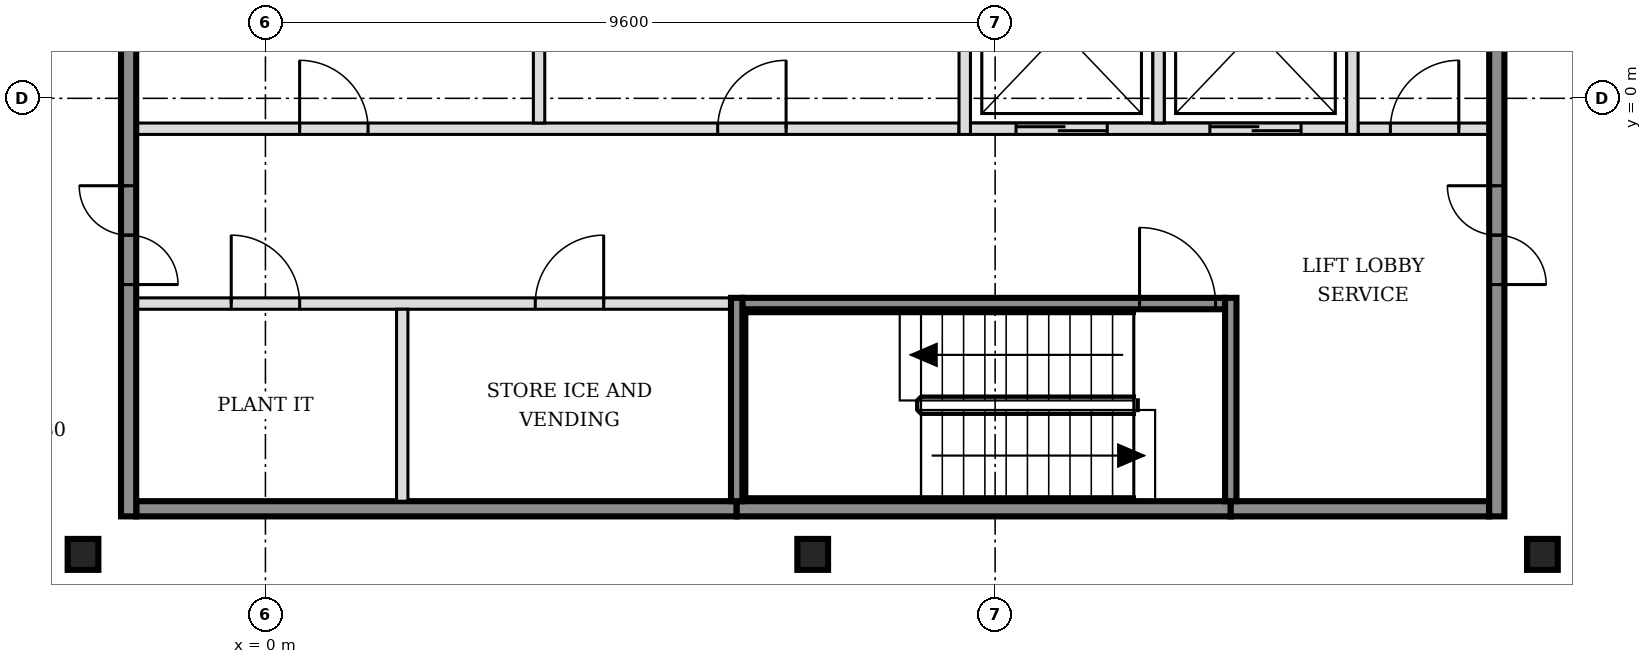
"""IFC4 building model, lengths in metres.
Left out: names, types, materials, properties, quantities, classifications, styles, units other than length and angle.
Written with IfcOpenShell. Run it as: python <this file> out.ifc"""

import sys

from ifc_helpers import new_model, si_unit, direction, frame, frame_2d, origin, origin_2d, place, context, subcontext, project, spatial, rectangle, i_section, extrude, element, fill, save


model = new_model("IFC4")
c1 = context("Model", 3, precision=1e-05, world=origin(), true_north=direction((0.0, 1.0)))
c2 = subcontext(c1, "Body", "Model", "MODEL_VIEW")
j1 = project(units=[si_unit("LENGTHUNIT", "METRE"), si_unit("PLANEANGLEUNIT", "RADIAN")], contexts=[c1])
p1 = place(None, origin())
s1 = spatial("IfcSite", under=j1, at=p1, CompositionType="ELEMENT")
p2 = place(p1, origin())
s2 = spatial("IfcBuilding", under=s1, at=p2, CompositionType="ELEMENT")
p3 = place(p2, frame((0.0, 0.0, 193.8)))
s3 = spatial("IfcBuildingStorey", under=s2, at=p3, CompositionType="ELEMENT", Elevation=193.8)
for number, where, z_axis, x_axis in (
    (1, (-2.4, -6.0, -0.15), (0.0, 0.0, 1.0), (1.0, 0.0, 0.0)),
    (2, (7.2, -6.0, -0.15), (0.0, 0.0, 1.0), (1.0, 0.0, 0.0)),
    (3, (16.8, -6.0, -0.15), (0.0, 0.0, 1.0), (1.0, 0.0, 0.0)),
):
    element("IfcColumn", number, at=place(p3, frame(where, z_axis=z_axis, x_axis=x_axis)), inside=s3, PredefinedType="COLUMN", context=c2, shape_type="SweptSolid", body=[
        extrude(i_section(OverallWidth=0.404, OverallDepth=0.407, WebThickness=0.027, FlangeThickness=0.044, FilletRadius=0.015, at=origin_2d()), origin(), (0.0, 0.0, 1.0), 3.6),
    ])
p4 = place(p3, frame((-1.7, -5.4, 0.0), z_axis=(0.0, 0.0, 1.0), x_axis=(1.0, 0.0, 0.0)))
e4 = element("IfcWall", 4, at=p4, inside=s3, PredefinedType="SOLIDWALL", context=c2, shape_type="SweptSolid", body=[
    extrude(rectangle(XDim=7.9, YDim=0.2, at=frame_2d((3.95, 0.0))), origin(), (0.0, 0.0, 1.0), 3.45),
])
p5 = place(p3, frame((6.2, -5.4, 0.0), z_axis=(0.0, 0.0, 1.0), x_axis=(1.0, 0.0, 0.0)))
e5 = element("IfcWall", 5, at=p5, inside=s3, PredefinedType="SOLIDWALL", context=c2, shape_type="SweptSolid", body=[
    extrude(rectangle(XDim=6.5, YDim=0.2, at=frame_2d((3.25, 0.0))), origin(), (0.0, 0.0, 1.0), 3.45),
])
p6 = place(p3, frame((12.7, -5.4, 0.0), z_axis=(0.0, 0.0, 1.0), x_axis=(1.0, 0.0, 0.0)))
e6 = element("IfcWall", 6, at=p6, inside=s3, PredefinedType="SOLIDWALL", context=c2, shape_type="SweptSolid", body=[
    extrude(rectangle(XDim=3.4, YDim=0.2, at=frame_2d((1.7, 0.0))), origin(), (0.0, 0.0, 1.0), 3.45),
])
p7 = place(p3, frame((-1.7, -2.7, 0.0), z_axis=(0.0, 0.0, 1.0), x_axis=(1.0, 0.0, 0.0)))
e7 = element("IfcWall", 7, at=p7, inside=s3, PredefinedType="PARTITIONING", context=c2, shape_type="SweptSolid", body=[
    extrude(rectangle(XDim=7.825, YDim=0.15, at=frame_2d((3.913, 0.0))), origin(), (0.0, 0.0, 1.0), 3.45),
])
p8 = place(p7, frame((1.25, 0.0, 0.0)))
e8 = element("IfcOpeningElement", 8, at=p8, cuts=e7, PredefinedType="OPENING", context=c2, shape_type="SweptSolid", body=[
    extrude(rectangle(XDim=0.9, YDim=2.1, at=frame_2d((0.45, 1.05))), frame((0.0, 0.085, 0.0), z_axis=(0.0, -1.0, 0.0), x_axis=(1.0, 0.0, 0.0)), (0.0, 0.0, 1.0), 0.17),
])
p9 = place(p7, frame((5.25, 0.0, 0.0)))
e9 = element("IfcOpeningElement", 9, at=p9, cuts=e7, PredefinedType="OPENING", context=c2, shape_type="SweptSolid", body=[
    extrude(rectangle(XDim=0.9, YDim=2.1, at=frame_2d((0.45, 1.05))), frame((0.0, 0.085, 0.0), z_axis=(0.0, -1.0, 0.0), x_axis=(1.0, 0.0, 0.0)), (0.0, 0.0, 1.0), 0.17),
])
p10 = place(p3, frame((6.275, -2.7, 0.0), z_axis=(0.0, 0.0, 1.0), x_axis=(1.0, 0.0, 0.0)))
e10 = element("IfcWall", 10, at=p10, inside=s3, PredefinedType="SOLIDWALL", context=c2, shape_type="SweptSolid", body=[
    extrude(rectangle(XDim=6.35, YDim=0.15, at=frame_2d((3.175, 0.0))), origin(), (0.0, 0.0, 1.0), 3.45),
])
p11 = place(p10, frame((5.225, 0.0, 0.0)))
e11 = element("IfcOpeningElement", 11, at=p11, cuts=e10, PredefinedType="OPENING", context=c2, shape_type="SweptSolid", body=[
    extrude(rectangle(XDim=1.0, YDim=2.1, at=frame_2d((0.5, 1.05))), frame((0.0, 0.085, 0.0), z_axis=(0.0, -1.0, 0.0), x_axis=(1.0, 0.0, 0.0)), (0.0, 0.0, 1.0), 0.17),
])
p12 = place(p3, frame((-1.7, -0.4, 0.0), z_axis=(0.0, 0.0, 1.0), x_axis=(1.0, 0.0, 0.0)))
e12 = element("IfcWall", 12, at=p12, inside=s3, PredefinedType="PARTITIONING", context=c2, shape_type="SweptSolid", body=[
    extrude(rectangle(XDim=10.825, YDim=0.15, at=frame_2d((5.413, 0.0))), origin(), (0.0, 0.0, 1.0), 3.45),
])
p13 = place(p12, frame((2.15, 0.0, 0.0)))
e13 = element("IfcOpeningElement", 13, at=p13, cuts=e12, PredefinedType="OPENING", context=c2, shape_type="SweptSolid", body=[
    extrude(rectangle(XDim=0.9, YDim=2.1, at=frame_2d((0.45, 1.05))), frame((0.0, 0.085, 0.0), z_axis=(0.0, -1.0, 0.0), x_axis=(1.0, 0.0, 0.0)), (0.0, 0.0, 1.0), 0.17),
])
p14 = place(p12, frame((7.65, 0.0, 0.0)))
e14 = element("IfcOpeningElement", 14, at=p14, cuts=e12, PredefinedType="OPENING", context=c2, shape_type="SweptSolid", body=[
    extrude(rectangle(XDim=0.9, YDim=2.1, at=frame_2d((0.45, 1.05))), frame((0.0, 0.085, 0.0), z_axis=(0.0, -1.0, 0.0), x_axis=(1.0, 0.0, 0.0)), (0.0, 0.0, 1.0), 0.17),
])
p15 = place(p3, frame((9.275, -0.4, 0.0), z_axis=(0.0, 0.0, 1.0), x_axis=(1.0, 0.0, 0.0)))
e15 = element("IfcWall", 15, at=p15, inside=s3, PredefinedType="SOLIDWALL", context=c2, shape_type="SweptSolid", body=[
    extrude(rectangle(XDim=4.95, YDim=0.15, at=frame_2d((2.475, 0.0))), origin(), (0.0, 0.0, 1.0), 3.45),
])
p16 = place(p15, frame((0.6, 0.0, 0.0)))
e16 = element("IfcOpeningElement", 16, at=p16, cuts=e15, PredefinedType="OPENING", context=c2, shape_type="SweptSolid", body=[
    extrude(rectangle(XDim=1.2, YDim=2.1, at=frame_2d((0.6, 1.05))), frame((0.0, 0.085, 0.0), z_axis=(0.0, -1.0, 0.0), x_axis=(1.0, 0.0, 0.0)), (0.0, 0.0, 1.0), 0.17),
])
p17 = place(p15, frame((3.15, 0.0, 0.0)))
e17 = element("IfcOpeningElement", 17, at=p17, cuts=e15, PredefinedType="OPENING", context=c2, shape_type="SweptSolid", body=[
    extrude(rectangle(XDim=1.2, YDim=2.1, at=frame_2d((0.6, 1.05))), frame((0.0, 0.085, 0.0), z_axis=(0.0, -1.0, 0.0), x_axis=(1.0, 0.0, 0.0)), (0.0, 0.0, 1.0), 0.17),
])
p18 = place(p3, frame((14.375, -0.4, 0.0), z_axis=(0.0, 0.0, 1.0), x_axis=(1.0, 0.0, 0.0)))
e18 = element("IfcWall", 18, at=p18, inside=s3, PredefinedType="PARTITIONING", context=c2, shape_type="SweptSolid", body=[
    extrude(rectangle(XDim=1.725, YDim=0.15, at=frame_2d((0.863, 0.0))), origin(), (0.0, 0.0, 1.0), 3.45),
])
p19 = place(p18, frame((0.425, 0.0, 0.0)))
e19 = element("IfcOpeningElement", 19, at=p19, cuts=e18, PredefinedType="OPENING", context=c2, shape_type="SweptSolid", body=[
    extrude(rectangle(XDim=0.9, YDim=2.1, at=frame_2d((0.45, 1.05))), frame((0.0, 0.085, 0.0), z_axis=(0.0, -1.0, 0.0), x_axis=(1.0, 0.0, 0.0)), (0.0, 0.0, 1.0), 0.17),
])
p20 = place(p3, frame((-1.8, -5.5, 0.0), z_axis=(0.0, 0.0, 1.0), x_axis=(0.0, 1.0, 0.0)))
e20 = element("IfcWall", 20, at=p20, inside=s3, PredefinedType="SOLIDWALL", context=c2, shape_type="SweptSolid", body=[
    extrude(rectangle(XDim=15.8, YDim=0.2, at=frame_2d((7.9, 0.0))), origin(), (0.0, 0.0, 1.0), 3.45),
])
p21 = place(p20, frame((3.05, 0.0, 0.0)))
e21 = element("IfcOpeningElement", 21, at=p21, cuts=e20, PredefinedType="OPENING", context=c2, shape_type="SweptSolid", body=[
    extrude(rectangle(XDim=1.3, YDim=2.1, at=frame_2d((0.65, 1.05))), frame((0.0, 0.11, 0.0), z_axis=(0.0, -1.0, 0.0), x_axis=(1.0, 0.0, 0.0)), (0.0, 0.0, 1.0), 0.22),
])
p22 = place(p20, frame((11.45, 0.0, 0.0)))
e22 = element("IfcOpeningElement", 22, at=p22, cuts=e20, PredefinedType="OPENING", context=c2, shape_type="SweptSolid", body=[
    extrude(rectangle(XDim=1.3, YDim=2.1, at=frame_2d((0.65, 1.05))), frame((0.0, 0.11, 0.0), z_axis=(0.0, -1.0, 0.0), x_axis=(1.0, 0.0, 0.0)), (0.0, 0.0, 1.0), 0.22),
])
p23 = place(p3, frame((1.8, -5.3, 0.0), z_axis=(0.0, 0.0, 1.0), x_axis=(0.0, 1.0, 0.0)))
e23 = element("IfcWall", 23, at=p23, inside=s3, PredefinedType="PARTITIONING", context=c2, shape_type="SweptSolid", body=[
    extrude(rectangle(XDim=2.525, YDim=0.15, at=frame_2d((1.263, 0.0))), origin(), (0.0, 0.0, 1.0), 3.45),
])
p24 = place(p3, frame((3.6, -0.325, 0.0), z_axis=(0.0, 0.0, 1.0), x_axis=(0.0, 1.0, 0.0)))
e24 = element("IfcWall", 24, at=p24, inside=s3, PredefinedType="PARTITIONING", context=c2, shape_type="SweptSolid", body=[
    extrude(rectangle(XDim=2.45, YDim=0.15, at=frame_2d((1.225, 0.0))), origin(), (0.0, 0.0, 1.0), 3.45),
])
p25 = place(p3, frame((6.2, -5.3, 0.0), z_axis=(0.0, 0.0, 1.0), x_axis=(0.0, 1.0, 0.0)))
e25 = element("IfcWall", 25, at=p25, inside=s3, PredefinedType="SOLIDWALL", context=c2, shape_type="SweptSolid", body=[
    extrude(rectangle(XDim=2.675, YDim=0.15, at=frame_2d((1.337, 0.0))), origin(), (0.0, 0.0, 1.0), 3.45),
])
p26 = place(p3, frame((9.2, -0.475, 0.0), z_axis=(0.0, 0.0, 1.0), x_axis=(0.0, 1.0, 0.0)))
e26 = element("IfcWall", 26, at=p26, inside=s3, PredefinedType="SOLIDWALL", context=c2, shape_type="SweptSolid", body=[
    extrude(rectangle(XDim=2.6, YDim=0.15, at=frame_2d((1.3, 0.0))), origin(), (0.0, 0.0, 1.0), 3.45),
])
p27 = place(p3, frame((11.75, -0.325, 0.0), z_axis=(0.0, 0.0, 1.0), x_axis=(0.0, 1.0, 0.0)))
e27 = element("IfcWall", 27, at=p27, inside=s3, PredefinedType="SOLIDWALL", context=c2, shape_type="SweptSolid", body=[
    extrude(rectangle(XDim=2.45, YDim=0.15, at=frame_2d((1.225, 0.0))), origin(), (0.0, 0.0, 1.0), 3.45),
])
p28 = place(p3, frame((12.7, -5.3, 0.0), z_axis=(0.0, 0.0, 1.0), x_axis=(0.0, 1.0, 0.0)))
e28 = element("IfcWall", 28, at=p28, inside=s3, PredefinedType="SOLIDWALL", context=c2, shape_type="SweptSolid", body=[
    extrude(rectangle(XDim=2.675, YDim=0.15, at=frame_2d((1.337, 0.0))), origin(), (0.0, 0.0, 1.0), 3.45),
])
p29 = place(p3, frame((14.3, -0.475, 0.0), z_axis=(0.0, 0.0, 1.0), x_axis=(0.0, 1.0, 0.0)))
e29 = element("IfcWall", 29, at=p29, inside=s3, PredefinedType="SOLIDWALL", context=c2, shape_type="SweptSolid", body=[
    extrude(rectangle(XDim=2.75, YDim=0.15, at=frame_2d((1.375, 0.0))), origin(), (0.0, 0.0, 1.0), 3.45),
])
p30 = place(p3, frame((16.2, -5.5, 0.0), z_axis=(0.0, 0.0, 1.0), x_axis=(0.0, 1.0, 0.0)))
e30 = element("IfcWall", 30, at=p30, inside=s3, PredefinedType="SOLIDWALL", context=c2, shape_type="SweptSolid", body=[
    extrude(rectangle(XDim=15.8, YDim=0.2, at=frame_2d((7.9, 0.0))), origin(), (0.0, 0.0, 1.0), 3.45),
])
p31 = place(p30, frame((3.05, 0.0, 0.0)))
e31 = element("IfcOpeningElement", 31, at=p31, cuts=e30, PredefinedType="OPENING", context=c2, shape_type="SweptSolid", body=[
    extrude(rectangle(XDim=1.3, YDim=2.1, at=frame_2d((0.65, 1.05))), frame((0.0, 0.11, 0.0), z_axis=(0.0, -1.0, 0.0), x_axis=(1.0, 0.0, 0.0)), (0.0, 0.0, 1.0), 0.22),
])
p32 = place(p30, frame((11.45, 0.0, 0.0)))
e32 = element("IfcOpeningElement", 32, at=p32, cuts=e30, PredefinedType="OPENING", context=c2, shape_type="SweptSolid", body=[
    extrude(rectangle(XDim=1.3, YDim=2.1, at=frame_2d((0.65, 1.05))), frame((0.0, 0.11, 0.0), z_axis=(0.0, -1.0, 0.0), x_axis=(1.0, 0.0, 0.0)), (0.0, 0.0, 1.0), 0.22),
])
p33 = place(p16, origin())
e33 = element("IfcDoor", 33, at=p33, inside=s3, OperationType="DOUBLE_DOOR_SLIDING", PredefinedType="DOOR", context=c2, shape_type="SweptSolid", body=[
    extrude(rectangle(XDim=1.2, YDim=2.1, at=frame_2d((0.6, 1.05))), frame((0.0, 0.025, 0.0), z_axis=(0.0, -1.0, 0.0), x_axis=(1.0, 0.0, 0.0)), (0.0, 0.0, 1.0), 0.05),
])
fill(e16, e33)
p34 = place(p17, origin())
e34 = element("IfcDoor", 34, at=p34, inside=s3, OperationType="DOUBLE_DOOR_SLIDING", PredefinedType="DOOR", context=c2, shape_type="SweptSolid", body=[
    extrude(rectangle(XDim=1.2, YDim=2.1, at=frame_2d((0.6, 1.05))), frame((0.0, 0.025, 0.0), z_axis=(0.0, -1.0, 0.0), x_axis=(1.0, 0.0, 0.0)), (0.0, 0.0, 1.0), 0.05),
])
fill(e17, e34)
p35 = place(p11, origin())
e35 = element("IfcDoor", 35, at=p35, inside=s3, OperationType="SINGLE_SWING_LEFT", PredefinedType="DOOR", context=c2, shape_type="SweptSolid", body=[
    extrude(rectangle(XDim=1.0, YDim=2.1, at=frame_2d((0.5, 1.05))), frame((0.0, 0.025, 0.0), z_axis=(0.0, -1.0, 0.0), x_axis=(1.0, 0.0, 0.0)), (0.0, 0.0, 1.0), 0.05),
])
fill(e11, e35)
p36 = place(p21, origin())
e36 = element("IfcDoor", 36, at=p36, inside=s3, OperationType="DOUBLE_DOOR_SINGLE_SWING", PredefinedType="DOOR", context=c2, shape_type="SweptSolid", body=[
    extrude(rectangle(XDim=1.3, YDim=2.1, at=frame_2d((0.65, 1.05))), frame((0.0, 0.025, 0.0), z_axis=(0.0, -1.0, 0.0), x_axis=(1.0, 0.0, 0.0)), (0.0, 0.0, 1.0), 0.05),
])
fill(e21, e36)
p37 = place(p31, origin())
e37 = element("IfcDoor", 37, at=p37, inside=s3, OperationType="DOUBLE_DOOR_SINGLE_SWING", PredefinedType="DOOR", context=c2, shape_type="SweptSolid", body=[
    extrude(rectangle(XDim=1.3, YDim=2.1, at=frame_2d((0.65, 1.05))), frame((0.0, 0.025, 0.0), z_axis=(0.0, -1.0, 0.0), x_axis=(1.0, 0.0, 0.0)), (0.0, 0.0, 1.0), 0.05),
])
fill(e31, e37)
p38 = place(p19, origin())
e38 = element("IfcDoor", 38, at=p38, inside=s3, OperationType="SINGLE_SWING_RIGHT", PredefinedType="DOOR", context=c2, shape_type="SweptSolid", body=[
    extrude(rectangle(XDim=0.9, YDim=2.1, at=frame_2d((0.45, 1.05))), frame((0.0, 0.025, 0.0), z_axis=(0.0, -1.0, 0.0), x_axis=(1.0, 0.0, 0.0)), (0.0, 0.0, 1.0), 0.05),
])
fill(e19, e38)
p39 = place(p8, origin())
e39 = element("IfcDoor", 39, at=p39, inside=s3, OperationType="SINGLE_SWING_LEFT", PredefinedType="DOOR", context=c2, shape_type="SweptSolid", body=[
    extrude(rectangle(XDim=0.9, YDim=2.1, at=frame_2d((0.45, 1.05))), frame((0.0, 0.025, 0.0), z_axis=(0.0, -1.0, 0.0), x_axis=(1.0, 0.0, 0.0)), (0.0, 0.0, 1.0), 0.05),
])
fill(e8, e39)
p40 = place(p9, origin())
e40 = element("IfcDoor", 40, at=p40, inside=s3, OperationType="SINGLE_SWING_RIGHT", PredefinedType="DOOR", context=c2, shape_type="SweptSolid", body=[
    extrude(rectangle(XDim=0.9, YDim=2.1, at=frame_2d((0.45, 1.05))), frame((0.0, 0.025, 0.0), z_axis=(0.0, -1.0, 0.0), x_axis=(1.0, 0.0, 0.0)), (0.0, 0.0, 1.0), 0.05),
])
fill(e9, e40)
p41 = place(p13, origin())
e41 = element("IfcDoor", 41, at=p41, inside=s3, OperationType="SINGLE_SWING_LEFT", PredefinedType="DOOR", context=c2, shape_type="SweptSolid", body=[
    extrude(rectangle(XDim=0.9, YDim=2.1, at=frame_2d((0.45, 1.05))), frame((0.0, 0.025, 0.0), z_axis=(0.0, -1.0, 0.0), x_axis=(1.0, 0.0, 0.0)), (0.0, 0.0, 1.0), 0.05),
])
fill(e13, e41)
p42 = place(p14, origin())
e42 = element("IfcDoor", 42, at=p42, inside=s3, OperationType="SINGLE_SWING_RIGHT", PredefinedType="DOOR", context=c2, shape_type="SweptSolid", body=[
    extrude(rectangle(XDim=0.9, YDim=2.1, at=frame_2d((0.45, 1.05))), frame((0.0, 0.025, 0.0), z_axis=(0.0, -1.0, 0.0), x_axis=(1.0, 0.0, 0.0)), (0.0, 0.0, 1.0), 0.05),
])
fill(e14, e42)
save(model, sys.argv[1])
